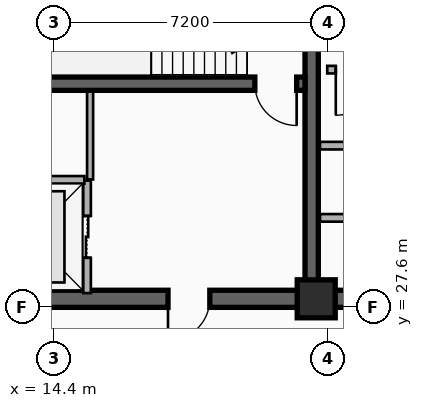
"""IFC4 building model, lengths in metres.
Left out: names, types, materials, properties, quantities, classifications, styles, units other than length and angle.
Written with IfcOpenShell. Run it as: python <this file> out.ifc"""

import sys

from ifc_helpers import new_model, si_unit, direction, frame, frame_2d, origin, origin_2d, place, context, subcontext, project, spatial, rectangle, extrude, element, fill, save


model = new_model("IFC4")
c1 = context("Model", 3, precision=1e-05, world=origin(), true_north=direction((0.0, 1.0)))
c2 = subcontext(c1, "Body", "Model", "MODEL_VIEW")
j1 = project(units=[si_unit("LENGTHUNIT", "METRE"), si_unit("PLANEANGLEUNIT", "RADIAN")], contexts=[c1])
p1 = place(None, origin())
s1 = spatial("IfcSite", under=j1, at=p1, CompositionType="ELEMENT")
p2 = place(p1, origin())
s2 = spatial("IfcBuilding", under=s1, at=p2, CompositionType="ELEMENT")
p3 = place(p2, frame((0.0, 0.0, 232.8)))
s3 = spatial("IfcBuildingStorey", under=s2, at=p3, CompositionType="ELEMENT", Elevation=232.8)
p4 = place(p3, frame((21.18, 27.82, 0.0), z_axis=(0.0, 0.0, 1.0), x_axis=(-1.0, 0.0, 0.0)))
e1 = element("IfcWall", 1, at=p4, inside=s3, PredefinedType="SHEAR", context=c2, shape_type="SweptSolid", body=[
    extrude(rectangle(XDim=9.03, YDim=0.45, at=frame_2d((4.515, 0.0))), origin(), (0.0, 0.0, 1.0), 3.6),
])
p5 = place(p4, frame((2.68, 0.0, 0.0)))
e2 = element("IfcOpeningElement", 2, at=p5, cuts=e1, PredefinedType="OPENING", context=c2, shape_type="SweptSolid", body=[
    extrude(rectangle(XDim=1.1, YDim=2.15, at=frame_2d((0.55, 1.075))), frame((0.0, 0.235, 0.0), z_axis=(0.0, -1.0, 0.0), x_axis=(1.0, 0.0, 0.0)), (0.0, 0.0, 1.0), 0.47),
])
p6 = place(p3, frame((33.15, 27.82, 0.0), z_axis=(0.0, 0.0, 1.0), x_axis=(-1.0, 0.0, 0.0)))
e3 = element("IfcWall", 3, at=p6, inside=s3, PredefinedType="SHEAR", context=c2, shape_type="SweptSolid", body=[
    extrude(rectangle(XDim=11.97, YDim=0.45, at=frame_2d((5.985, 0.0))), origin(), (0.0, 0.0, 1.0), 3.6),
])
p7 = place(p6, frame((6.1, 0.0, 0.0)))
e4 = element("IfcOpeningElement", 4, at=p7, cuts=e3, PredefinedType="OPENING", context=c2, shape_type="SweptSolid", body=[
    extrude(rectangle(XDim=1.6, YDim=2.2, at=frame_2d((0.8, 1.1))), frame((0.0, 0.235, 0.0), z_axis=(0.0, -1.0, 0.0), x_axis=(1.0, 0.0, 0.0)), (0.0, 0.0, 1.0), 0.47),
])
p8 = place(p3, frame((21.18, 28.045, 0.0), z_axis=(0.0, 0.0, 1.0), x_axis=(0.0, 1.0, 0.0)))
e5 = element("IfcWall", 5, at=p8, inside=s3, PredefinedType="SHEAR", context=c2, shape_type="SweptSolid", body=[
    extrude(rectangle(XDim=8.78, YDim=0.35, at=frame_2d((4.39, 0.0))), origin(), (0.0, 0.0, 1.0), 3.6),
])
p9 = place(p3, frame((21.005, 33.48, 0.0), z_axis=(0.0, 0.0, 1.0), x_axis=(-1.0, 0.0, 0.0)))
e6 = element("IfcWall", 6, at=p9, inside=s3, PredefinedType="SHEAR", context=c2, shape_type="SweptSolid", body=[
    extrude(rectangle(XDim=8.63, YDim=0.35, at=frame_2d((4.315, 0.0))), origin(), (0.0, 0.0, 1.0), 3.6),
])
p10 = place(p9, frame((0.22, 0.0, 0.0)))
e7 = element("IfcOpeningElement", 7, at=p10, cuts=e6, PredefinedType="OPENING", context=c2, shape_type="SweptSolid", body=[
    extrude(rectangle(XDim=1.1, YDim=2.15, at=frame_2d((0.55, 1.075))), frame((0.0, 0.185, 0.0), z_axis=(0.0, -1.0, 0.0), x_axis=(1.0, 0.0, 0.0)), (0.0, 0.0, 1.0), 0.37),
])
p11 = place(p3, frame((21.3, 27.82, 0.0), z_axis=(0.0, 0.0, 1.0), x_axis=(1.0, 0.0, 0.0)))
e8 = element("IfcColumn", 8, at=p11, inside=s3, PredefinedType="COLUMN", context=c2, shape_type="SweptSolid", body=[
    extrude(rectangle(XDim=1.0, YDim=1.0, at=origin_2d()), origin(), (0.0, 0.0, 1.0), 3.6),
])
p12 = place(p3, frame((15.27, 27.97, 0.0), z_axis=(0.0, 0.0, 1.0), x_axis=(0.0, 1.0, 0.0)))
e9 = element("IfcWall", 9, at=p12, inside=s3, PredefinedType="PARTITIONING", context=c2, shape_type="SweptSolid", body=[
    extrude(rectangle(XDim=2.96, YDim=0.2, at=frame_2d((1.48, 0.0))), origin(), (0.0, 0.0, 1.0), 2.41),
])
p13 = place(p12, frame((0.93, 0.0, 0.0)))
e10 = element("IfcOpeningElement", 10, at=p13, cuts=e9, PredefinedType="OPENING", context=c2, shape_type="SweptSolid", body=[
    extrude(rectangle(XDim=1.1, YDim=2.15, at=frame_2d((0.55, 1.075))), frame((0.0, 0.11, 0.0), z_axis=(0.0, -1.0, 0.0), x_axis=(1.0, 0.0, 0.0)), (0.0, 0.0, 1.0), 0.22),
])
p14 = place(p3, frame((12.45, 30.95, 0.0), z_axis=(0.0, 0.0, 1.0), x_axis=(1.0, 0.0, 0.0)))
e11 = element("IfcWall", 11, at=p14, inside=s3, PredefinedType="PARTITIONING", context=c2, shape_type="SweptSolid", body=[
    extrude(rectangle(XDim=2.75, YDim=0.2, at=frame_2d((1.375, 0.0))), origin(), (0.0, 0.0, 1.0), 2.41),
])
p15 = place(p3, frame((21.4, 31.85, 0.0), z_axis=(0.0, 0.0, 1.0), x_axis=(1.0, 0.0, 0.0)))
e12 = element("IfcWall", 12, at=p15, inside=s3, PredefinedType="PARTITIONING", context=c2, shape_type="SweptSolid", body=[
    extrude(rectangle(XDim=3.66, YDim=0.2, at=frame_2d((1.83, 0.0))), origin(), (0.0, 0.0, 1.0), 2.41),
])
p16 = place(p15, frame((1.23, 0.0, 0.0)))
e13 = element("IfcOpeningElement", 13, at=p16, cuts=e12, PredefinedType="OPENING", context=c2, shape_type="SweptSolid", body=[
    extrude(rectangle(XDim=1.2, YDim=2.15, at=frame_2d((0.6, 1.075))), frame((0.0, 0.11, 0.0), z_axis=(0.0, -1.0, 0.0), x_axis=(1.0, 0.0, 0.0)), (0.0, 0.0, 1.0), 0.22),
])
p17 = place(p3, frame((25.11, 33.85, 0.0), z_axis=(0.0, 0.0, 1.0), x_axis=(-1.0, 0.0, 0.0)))
e14 = element("IfcWall", 14, at=p17, inside=s3, PredefinedType="PARTITIONING", context=c2, shape_type="SweptSolid", body=[
    extrude(rectangle(XDim=3.52, YDim=0.2, at=frame_2d((1.76, 0.0))), origin(), (0.0, 0.0, 1.0), 2.41),
])
p18 = place(p17, frame((2.095, 0.0, 0.0)))
e15 = element("IfcOpeningElement", 15, at=p18, cuts=e14, PredefinedType="OPENING", context=c2, shape_type="SweptSolid", body=[
    extrude(rectangle(XDim=1.2, YDim=2.15, at=frame_2d((0.6, 1.075))), frame((0.0, 0.11, 0.0), z_axis=(0.0, -1.0, 0.0), x_axis=(1.0, 0.0, 0.0)), (0.0, 0.0, 1.0), 0.22),
])
p19 = place(p3, frame((21.4, 29.95, 0.0), z_axis=(0.0, 0.0, 1.0), x_axis=(1.0, 0.0, 0.0)))
e16 = element("IfcWall", 16, at=p19, inside=s3, PredefinedType="PARTITIONING", context=c2, shape_type="SweptSolid", body=[
    extrude(rectangle(XDim=3.66, YDim=0.2, at=frame_2d((1.83, 0.0))), origin(), (0.0, 0.0, 1.0), 2.41),
])
p20 = place(p3, frame((15.35, 30.96, 0.0), z_axis=(0.0, 0.0, 1.0), x_axis=(0.0, 1.0, 0.0)))
e17 = element("IfcWall", 17, at=p20, inside=s3, PredefinedType="PARTITIONING", context=c2, shape_type="SweptSolid", body=[
    extrude(rectangle(XDim=2.31, YDim=0.16, at=frame_2d((1.155, 0.0))), origin(), (0.0, 0.0, 1.0), 3.34),
])
p21 = place(p13, origin())
e18 = element("IfcDoor", 18, at=p21, inside=s3, OperationType="DOUBLE_DOOR_SLIDING", PredefinedType="DOOR", context=c2, shape_type="SweptSolid", body=[
    extrude(rectangle(XDim=1.1, YDim=2.15, at=frame_2d((0.55, 1.075))), frame((0.0, 0.025, 0.0), z_axis=(0.0, -1.0, 0.0), x_axis=(1.0, 0.0, 0.0)), (0.0, 0.0, 1.0), 0.05),
])
fill(e10, e18)
p22 = place(p10, origin())
e19 = element("IfcDoor", 19, at=p22, inside=s3, OperationType="SINGLE_SWING_LEFT", PredefinedType="DOOR", context=c2, shape_type="SweptSolid", body=[
    extrude(rectangle(XDim=1.1, YDim=2.15, at=frame_2d((0.55, 1.075))), frame((0.0, 0.025, 0.0), z_axis=(0.0, -1.0, 0.0), x_axis=(1.0, 0.0, 0.0)), (0.0, 0.0, 1.0), 0.05),
])
fill(e7, e19)
p23 = place(p5, origin())
e20 = element("IfcDoor", 20, at=p23, inside=s3, OperationType="SINGLE_SWING_RIGHT", PredefinedType="DOOR", context=c2, shape_type="SweptSolid", body=[
    extrude(rectangle(XDim=1.1, YDim=2.15, at=frame_2d((0.55, 1.075))), frame((0.0, 0.025, 0.0), z_axis=(0.0, -1.0, 0.0), x_axis=(1.0, 0.0, 0.0)), (0.0, 0.0, 1.0), 0.05),
])
fill(e2, e20)
p24 = place(p18, origin())
e21 = element("IfcDoor", 21, at=p24, inside=s3, OperationType="SINGLE_SWING_RIGHT", PredefinedType="DOOR", context=c2, shape_type="SweptSolid", body=[
    extrude(rectangle(XDim=1.2, YDim=2.15, at=frame_2d((0.6, 1.075))), frame((0.0, 0.025, 0.0), z_axis=(0.0, -1.0, 0.0), x_axis=(1.0, 0.0, 0.0)), (0.0, 0.0, 1.0), 0.05),
])
fill(e15, e21)
save(model, sys.argv[1])
